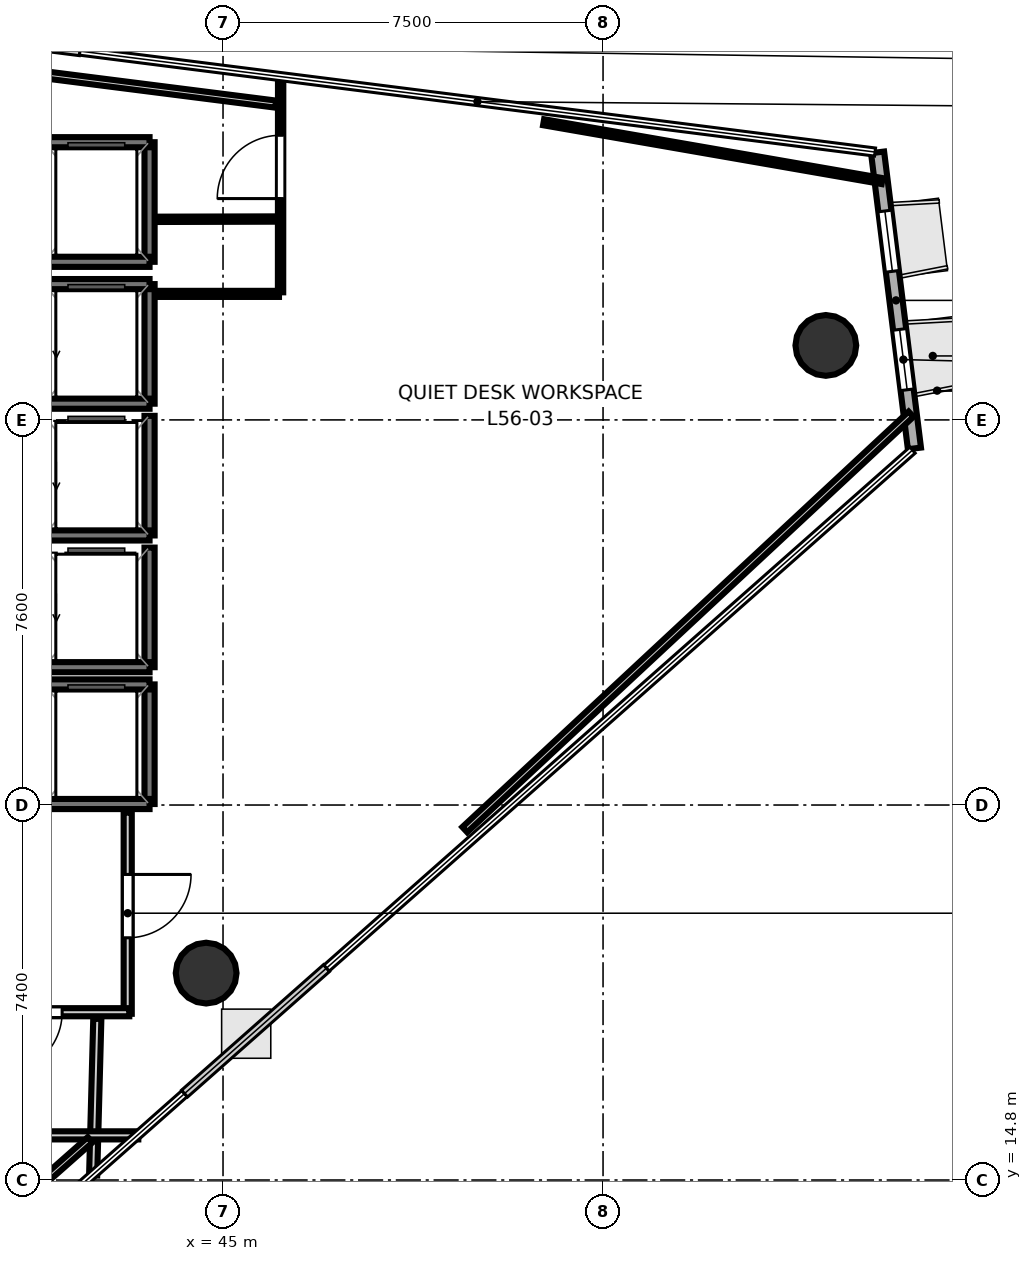
"""IFC4 building model, lengths in metres.
Left out: names, types, materials, properties, quantities, classifications, styles, units other than length and angle.
Written with IfcOpenShell. Run it as: python <this file> out.ifc"""

import sys

from ifc_helpers import new_model, si_unit, direction, frame, frame_2d, origin, origin_2d, place, context, subcontext, project, spatial, rectangle, hollow_circle, extrude, element, fill, save


model = new_model("IFC4")
c1 = context("Model", 3, precision=1e-05, world=origin(), true_north=direction((0.0, 1.0)))
c2 = subcontext(c1, "Body", "Model", "MODEL_VIEW")
j1 = project(units=[si_unit("LENGTHUNIT", "METRE"), si_unit("PLANEANGLEUNIT", "RADIAN")], contexts=[c1])
p1 = place(None, origin())
s1 = spatial("IfcSite", under=j1, at=p1, CompositionType="ELEMENT")
p2 = place(p1, origin())
s2 = spatial("IfcBuilding", under=s1, at=p2, CompositionType="ELEMENT")
p3 = place(p2, frame((0.0, 0.0, 218.8)))
s3 = spatial("IfcBuildingStorey", under=s2, at=p3, CompositionType="ELEMENT", Elevation=218.8)
for number, where, z_axis, x_axis in (
    (1, (56.897, 31.27, 0.0), (0.0, 0.0, 1.0), (1.0, 0.0, 0.0)),
    (2, (44.667, 18.883, 0.0), (0.0, 0.0, 1.0), (1.0, 0.0, 0.0)),
):
    element("IfcColumn", number, at=place(p3, frame(where, z_axis=z_axis, x_axis=x_axis)), inside=s3, PredefinedType="COLUMN", context=c2, shape_type="SweptSolid", body=[
        extrude(hollow_circle(Radius=0.6, WallThickness=0.03, at=origin_2d()), origin(), (0.0, 0.0, 1.0), 3.7),
    ])
p4 = place(p3, frame((58.645, 29.237, 0.0), z_axis=(0.0, 0.0, 1.0), x_axis=(-0.123529462053, 0.992340905135, 0.0)))
e3 = element("IfcWall", 3, at=p4, inside=s3, PredefinedType="SOLIDWALL", context=c2, shape_type="SweptSolid", body=[
    extrude(rectangle(XDim=5.888, YDim=0.26, at=frame_2d((2.944, 0.0))), origin(), (0.0, 0.0, 1.0), 3.52),
])
p5 = place(p4, frame((1.166, 0.0, 0.9)))
e4 = element("IfcOpeningElement", 4, at=p5, cuts=e3, PredefinedType="OPENING", context=c2, shape_type="SweptSolid", body=[
    extrude(rectangle(XDim=1.2, YDim=2.0, at=frame_2d((0.6, 1.0))), frame((0.0, 0.14, 0.0), z_axis=(0.0, -1.0, 0.0), x_axis=(1.0, 0.0, 0.0)), (0.0, 0.0, 1.0), 0.28),
])
p6 = place(p4, frame((3.521, 0.0, 0.9)))
e5 = element("IfcOpeningElement", 5, at=p6, cuts=e3, PredefinedType="OPENING", context=c2, shape_type="SweptSolid", body=[
    extrude(rectangle(XDim=1.2, YDim=2.0, at=frame_2d((0.6, 1.0))), frame((0.0, 0.14, 0.0), z_axis=(0.0, -1.0, 0.0), x_axis=(1.0, 0.0, 0.0)), (0.0, 0.0, 1.0), 0.28),
])
p7 = place(p3, frame((43.55, 30.12, 0.0), z_axis=(0.0, 0.0, 1.0), x_axis=(0.0, 1.0, 0.0)))
e6 = element("IfcWall", 6, at=p7, inside=s3, PredefinedType="SOLIDWALL", context=c2, shape_type="SweptSolid", body=[
    extrude(rectangle(XDim=2.36, YDim=0.2, at=frame_2d((1.18, 0.0))), origin(), (0.0, 0.0, 1.0), 3.52),
])
for number, where, z_axis, x_axis in (
    (7, (41.45, 32.48, 0.0), (0.0, 0.0, 1.0), (1.0, 0.0, 0.0)),
    (8, (41.45, 30.12, 0.0), (0.0, 0.0, 1.0), (1.0, 0.0, 0.0)),
):
    element("IfcWall", number, at=place(p3, frame(where, z_axis=z_axis, x_axis=x_axis)), inside=s3, PredefinedType="SOLIDWALL", context=c2, shape_type="SweptSolid", body=[
        extrude(rectangle(XDim=2.1, YDim=0.2, at=frame_2d((1.05, 0.0))), origin(), (0.0, 0.0, 1.0), 3.52),
    ])
p8 = place(p3, frame((43.55, 27.52, 0.0), z_axis=(0.0, 0.0, 1.0), x_axis=(0.0, 1.0, 0.0)))
e9 = element("IfcWall", 9, at=p8, inside=s3, PredefinedType="SOLIDWALL", context=c2, shape_type="SweptSolid", body=[
    extrude(rectangle(XDim=2.36, YDim=0.2, at=frame_2d((1.18, 0.0))), origin(), (0.0, 0.0, 1.0), 3.52),
])
p9 = place(p3, frame((41.45, 27.52, 0.0), z_axis=(0.0, 0.0, 1.0), x_axis=(1.0, 0.0, 0.0)))
e10 = element("IfcWall", 10, at=p9, inside=s3, PredefinedType="SOLIDWALL", context=c2, shape_type="SweptSolid", body=[
    extrude(rectangle(XDim=2.1, YDim=0.2, at=frame_2d((1.05, 0.0))), origin(), (0.0, 0.0, 1.0), 3.52),
])
p10 = place(p3, frame((43.55, 24.92, 0.0), z_axis=(0.0, 0.0, 1.0), x_axis=(0.0, 1.0, 0.0)))
e11 = element("IfcWall", 11, at=p10, inside=s3, PredefinedType="SOLIDWALL", context=c2, shape_type="SweptSolid", body=[
    extrude(rectangle(XDim=2.36, YDim=0.2, at=frame_2d((1.18, 0.0))), origin(), (0.0, 0.0, 1.0), 3.52),
])
p11 = place(p3, frame((41.45, 24.92, 0.0), z_axis=(0.0, 0.0, 1.0), x_axis=(1.0, 0.0, 0.0)))
e12 = element("IfcWall", 12, at=p11, inside=s3, PredefinedType="SOLIDWALL", context=c2, shape_type="SweptSolid", body=[
    extrude(rectangle(XDim=2.1, YDim=0.2, at=frame_2d((1.05, 0.0))), origin(), (0.0, 0.0, 1.0), 3.52),
])
p12 = place(p3, frame((43.55, 22.22, 0.0), z_axis=(0.0, 0.0, 1.0), x_axis=(0.0, 1.0, 0.0)))
e13 = element("IfcWall", 13, at=p12, inside=s3, PredefinedType="SOLIDWALL", context=c2, shape_type="SweptSolid", body=[
    extrude(rectangle(XDim=2.36, YDim=0.2, at=frame_2d((1.18, 0.0))), origin(), (0.0, 0.0, 1.0), 3.52),
])
for number, where, z_axis, x_axis in (
    (14, (41.45, 24.58, 0.0), (0.0, 0.0, 1.0), (1.0, 0.0, 0.0)),
    (15, (41.45, 22.22, 0.0), (0.0, 0.0, 1.0), (1.0, 0.0, 0.0)),
):
    element("IfcWall", number, at=place(p3, frame(where, z_axis=z_axis, x_axis=x_axis)), inside=s3, PredefinedType="SOLIDWALL", context=c2, shape_type="SweptSolid", body=[
        extrude(rectangle(XDim=2.1, YDim=0.2, at=frame_2d((1.05, 0.0))), origin(), (0.0, 0.0, 1.0), 3.52),
    ])
p13 = place(p3, frame((43.55, 32.92, 0.0), z_axis=(0.0, 0.0, 1.0), x_axis=(0.0, 1.0, 0.0)))
e16 = element("IfcWall", 16, at=p13, inside=s3, PredefinedType="SOLIDWALL", context=c2, shape_type="SweptSolid", body=[
    extrude(rectangle(XDim=2.36, YDim=0.2, at=frame_2d((1.18, 0.0))), origin(), (0.0, 0.0, 1.0), 3.52),
])
for number, where, z_axis, x_axis in (
    (17, (41.45, 35.28, 0.0), (0.0, 0.0, 1.0), (1.0, 0.0, 0.0)),
    (18, (41.45, 32.92, 0.0), (0.0, 0.0, 1.0), (1.0, 0.0, 0.0)),
):
    element("IfcWall", number, at=place(p3, frame(where, z_axis=z_axis, x_axis=x_axis)), inside=s3, PredefinedType="SOLIDWALL", context=c2, shape_type="SweptSolid", body=[
        extrude(rectangle(XDim=2.1, YDim=0.2, at=frame_2d((1.05, 0.0))), origin(), (0.0, 0.0, 1.0), 3.52),
    ])
p14 = place(p3, frame((43.119, 22.05, 0.0), z_axis=(0.0, 0.0, 1.0), x_axis=(0.0, -1.0, 0.0)))
e19 = element("IfcWall", 19, at=p14, inside=s3, PredefinedType="PARTITIONING", context=c2, shape_type="SweptSolid", body=[
    extrude(rectangle(XDim=3.97, YDim=0.16, at=frame_2d((1.985, 0.0))), origin(), (0.0, 0.0, 1.0), 2.84),
])
p15 = place(p14, frame((1.22, 0.0, 0.0)))
e20 = element("IfcOpeningElement", 20, at=p15, cuts=e19, PredefinedType="OPENING", context=c2, shape_type="SweptSolid", body=[
    extrude(rectangle(XDim=1.25, YDim=2.2, at=frame_2d((0.625, 1.1))), frame((0.0, 0.09, 0.0), z_axis=(0.0, -1.0, 0.0), x_axis=(1.0, 0.0, 0.0)), (0.0, 0.0, 1.0), 0.18),
])
p16 = place(p3, frame((43.15, 18.111, 0.0), z_axis=(0.0, 0.0, 1.0), x_axis=(-1.0, 0.0, 0.0)))
e21 = element("IfcWall", 21, at=p16, inside=s3, PredefinedType="PARTITIONING", context=c2, shape_type="SweptSolid", body=[
    extrude(rectangle(XDim=2.73, YDim=0.16, at=frame_2d((1.365, 0.0))), origin(), (0.0, 0.0, 1.0), 2.84),
])
p17 = place(p16, frame((1.325, 0.0, 0.0)))
e22 = element("IfcOpeningElement", 22, at=p17, cuts=e21, PredefinedType="OPENING", context=c2, shape_type="SweptSolid", body=[
    extrude(rectangle(XDim=1.2, YDim=2.15, at=frame_2d((0.6, 1.075))), frame((0.0, 0.09, 0.0), z_axis=(0.0, -1.0, 0.0), x_axis=(1.0, 0.0, 0.0)), (0.0, 0.0, 1.0), 0.18),
])
p18 = place(p3, frame((42.519, 17.981, 0.0), z_axis=(0.0, 0.0, 1.0), x_axis=(-0.026620353414, -0.999645615598, 0.0)))
e23 = element("IfcWall", 23, at=p18, inside=s3, PredefinedType="PARTITIONING", context=c2, shape_type="SweptSolid", body=[
    extrude(rectangle(XDim=3.091, YDim=0.16, at=frame_2d((1.545, 0.0))), origin(), (0.0, 0.0, 1.0), 2.84),
])
p19 = place(p3, frame((43.328, 15.681, 0.0), z_axis=(0.0, 0.0, 1.0), x_axis=(-1.0, 0.0, 0.0)))
e24 = element("IfcWall", 24, at=p19, inside=s3, PredefinedType="PARTITIONING", context=c2, shape_type="SweptSolid", body=[
    extrude(rectangle(XDim=14.928, YDim=0.16, at=frame_2d((7.464, 0.0))), origin(), (0.0, 0.0, 1.0), 2.84),
])
p20 = place(p19, frame((3.157, 0.0, 0.0)))
e25 = element("IfcOpeningElement", 25, at=p20, cuts=e24, PredefinedType="OPENING", context=c2, shape_type="SweptSolid", body=[
    extrude(rectangle(XDim=1.25, YDim=2.2, at=frame_2d((0.625, 1.1))), frame((0.0, 0.09, 0.0), z_axis=(0.0, -1.0, 0.0), x_axis=(1.0, 0.0, 0.0)), (0.0, 0.0, 1.0), 0.18),
])
p21 = place(p19, frame((9.727, 0.0, 0.0)))
e26 = element("IfcOpeningElement", 26, at=p21, cuts=e24, PredefinedType="OPENING", context=c2, shape_type="SweptSolid", body=[
    extrude(rectangle(XDim=1.25, YDim=2.2, at=frame_2d((0.625, 1.1))), frame((0.0, 0.09, 0.0), z_axis=(0.0, -1.0, 0.0), x_axis=(1.0, 0.0, 0.0)), (0.0, 0.0, 1.0), 0.18),
])
p22 = place(p3, frame((42.377, 15.593, 0.0), z_axis=(0.0, 0.0, 1.0), x_axis=(-0.749252451683, -0.662284503553, 0.0)))
e27 = element("IfcWall", 27, at=p22, inside=s3, PredefinedType="PARTITIONING", context=c2, shape_type="SweptSolid", body=[
    extrude(rectangle(XDim=7.61, YDim=0.14, at=frame_2d((3.805, 0.0))), origin(), (0.0, 0.0, 1.0), 2.84),
])
p23 = place(p3, frame((51.327, 35.674, 0.0), z_axis=(0.0, 0.0, 1.0), x_axis=(0.985225755906, -0.171260649011, 0.0)))
e28 = element("IfcWall", 28, at=p23, inside=s3, PredefinedType="PARTITIONING", context=c2, shape_type="SweptSolid", body=[
    extrude(rectangle(XDim=6.781, YDim=0.12, at=frame_2d((3.391, 0.0))), origin(), (0.0, 0.0, 1.0), 2.84),
])
p24 = place(p3, frame((58.578, 29.913, 0.0), z_axis=(0.0, 0.0, 1.0), x_axis=(-0.731897463865, -0.681414779989, 0.0)))
e29 = element("IfcWall", 29, at=p24, inside=s3, PredefinedType="PARTITIONING", context=c2, shape_type="SweptSolid", body=[
    extrude(rectangle(XDim=12.032, YDim=0.14, at=frame_2d((6.016, 0.0))), origin(), (0.0, 0.0, 1.0), 2.84),
])
p25 = place(p3, frame((43.72, 32.287, 0.0), z_axis=(0.0, 0.0, 1.0), x_axis=(1.0, 0.0, 0.0)))
e30 = element("IfcWall", 30, at=p25, inside=s3, PredefinedType="PARTITIONING", context=c2, shape_type="SweptSolid", body=[
    extrude(rectangle(XDim=2.385, YDim=0.12, at=frame_2d((1.192, 0.0))), origin(), (0.0, 0.0, 1.0), 2.84),
])
p26 = place(p3, frame((46.135, 32.318, 0.0), z_axis=(0.0, 0.0, 1.0), x_axis=(0.000399588962, 0.999999920164, 0.0)))
e31 = element("IfcWall", 31, at=p26, inside=s3, PredefinedType="PARTITIONING", context=c2, shape_type="SweptSolid", body=[
    extrude(rectangle(XDim=4.277, YDim=0.105, at=frame_2d((2.138, 0.0))), origin(), (0.0, 0.0, 1.0), 2.84),
])
p27 = place(p26, frame((1.849, 0.0, 0.0)))
e32 = element("IfcOpeningElement", 32, at=p27, cuts=e31, PredefinedType="OPENING", context=c2, shape_type="SweptSolid", body=[
    extrude(rectangle(XDim=1.25, YDim=2.2, at=frame_2d((0.625, 1.1))), frame((0.0, 0.062, 0.0), z_axis=(0.0, -1.0, 0.0), x_axis=(1.0, 0.0, 0.0)), (0.0, 0.0, 1.0), 0.125),
])
p28 = place(p3, frame((37.226, 37.15, 0.0), z_axis=(0.0, 0.0, 1.0), x_axis=(0.992042774502, -0.125901284976, 0.0)))
e33 = element("IfcWall", 33, at=p28, inside=s3, PredefinedType="PARTITIONING", context=c2, shape_type="SweptSolid", body=[
    extrude(rectangle(XDim=8.885, YDim=0.14, at=frame_2d((4.443, 0.0))), origin(), (0.0, 0.0, 1.0), 2.84),
])
p29 = place(p3, frame((46.043, 33.764, 0.0), z_axis=(0.0, 0.0, 1.0), x_axis=(-0.999996819601, -0.002522060075, 0.0)))
e34 = element("IfcWall", 34, at=p29, inside=s3, PredefinedType="PARTITIONING", context=c2, shape_type="SweptSolid", body=[
    extrude(rectangle(XDim=2.323, YDim=0.105, at=frame_2d((1.162, 0.0))), origin(), (0.0, 0.0, 1.0), 2.84),
])
p30 = place(p17, origin())
e35 = element("IfcDoor", 35, at=p30, inside=s3, OperationType="SINGLE_SWING_RIGHT", PredefinedType="DOOR", context=c2, shape_type="SweptSolid", body=[
    extrude(rectangle(XDim=1.2, YDim=2.15, at=frame_2d((0.6, 1.075))), frame((0.0, 0.025, 0.0), z_axis=(0.0, -1.0, 0.0), x_axis=(1.0, 0.0, 0.0)), (0.0, 0.0, 1.0), 0.05),
])
fill(e22, e35)
p31 = place(p15, origin())
e36 = element("IfcDoor", 36, at=p31, inside=s3, OperationType="SINGLE_SWING_LEFT", PredefinedType="DOOR", context=c2, shape_type="SweptSolid", body=[
    extrude(rectangle(XDim=1.25, YDim=2.2, at=frame_2d((0.625, 1.1))), frame((0.0, 0.025, 0.0), z_axis=(0.0, -1.0, 0.0), x_axis=(1.0, 0.0, 0.0)), (0.0, 0.0, 1.0), 0.05),
])
fill(e20, e36)
p32 = place(p27, origin())
e37 = element("IfcDoor", 37, at=p32, inside=s3, OperationType="SINGLE_SWING_LEFT", PredefinedType="DOOR", context=c2, shape_type="SweptSolid", body=[
    extrude(rectangle(XDim=1.25, YDim=2.2, at=frame_2d((0.625, 1.1))), frame((0.0, 0.025, 0.0), z_axis=(0.0, -1.0, 0.0), x_axis=(1.0, 0.0, 0.0)), (0.0, 0.0, 1.0), 0.05),
])
fill(e32, e37)
p33 = place(p5, origin())
e38 = element("IfcWindow", 38, at=p33, inside=s3, PartitioningType="SINGLE_PANEL", PredefinedType="WINDOW", context=c2, shape_type="SweptSolid", body=[
    extrude(rectangle(XDim=1.2, YDim=2.0, at=frame_2d((0.6, 1.0))), frame((0.0, 0.03, 0.0), z_axis=(0.0, -1.0, 0.0), x_axis=(1.0, 0.0, 0.0)), (0.0, 0.0, 1.0), 0.06),
])
fill(e4, e38)
p34 = place(p6, origin())
e39 = element("IfcWindow", 39, at=p34, inside=s3, PartitioningType="SINGLE_PANEL", PredefinedType="WINDOW", context=c2, shape_type="SweptSolid", body=[
    extrude(rectangle(XDim=1.2, YDim=2.0, at=frame_2d((0.6, 1.0))), frame((0.0, 0.03, 0.0), z_axis=(0.0, -1.0, 0.0), x_axis=(1.0, 0.0, 0.0)), (0.0, 0.0, 1.0), 0.06),
])
fill(e5, e39)
save(model, sys.argv[1])
